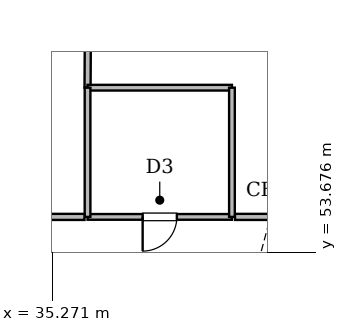
"""IFC4 building model, lengths in metres.
Left out: names, types, materials, properties, quantities, classifications, styles, units other than length and angle.
Written with IfcOpenShell. Run it as: python <this file> out.ifc"""

import sys

from ifc_helpers import new_model, si_unit, direction, frame, frame_2d, origin, place, context, subcontext, project, spatial, rectangle, extrude, element, fill, save


model = new_model("IFC4")
c1 = context("Model", 3, precision=1e-05, world=origin(), true_north=direction((0.0, 1.0)))
c2 = subcontext(c1, "Body", "Model", "MODEL_VIEW")
j1 = project(units=[si_unit("LENGTHUNIT", "METRE"), si_unit("PLANEANGLEUNIT", "RADIAN")], contexts=[c1])
p1 = place(None, origin())
s1 = spatial("IfcSite", under=j1, at=p1, CompositionType="ELEMENT")
p2 = place(p1, origin())
s2 = spatial("IfcBuilding", under=s1, at=p2, CompositionType="ELEMENT")
p3 = place(p2, frame((0.0, 0.0, 24.0)))
s3 = spatial("IfcBuildingStorey", under=s2, at=p3, CompositionType="ELEMENT", Elevation=24.0)
p4 = place(p3, frame((40.0, 54.6, 0.0), z_axis=(0.0, 0.0, 1.0), x_axis=(-1.0, 0.0, 0.0)))
e1 = element("IfcWall", 1, at=p4, inside=s3, PredefinedType="PLUMBINGWALL", context=c2, shape_type="SweptSolid", body=[
    extrude(rectangle(XDim=3.8, YDim=0.15, at=frame_2d((1.9, 0.0))), origin(), (0.0, 0.0, 1.0), 4.263),
])
p5 = place(p4, frame((1.45, 0.0, 0.0)))
e2 = element("IfcOpeningElement", 2, at=p5, cuts=e1, PredefinedType="OPENING", context=c2, shape_type="SweptSolid", body=[
    extrude(rectangle(XDim=0.9, YDim=2.1, at=frame_2d((0.45, 1.05))), frame((0.0, 0.085, 0.0), z_axis=(0.0, -1.0, 0.0), x_axis=(1.0, 0.0, 0.0)), (0.0, 0.0, 1.0), 0.17),
])
p6 = place(p3, frame((36.2, 58.0, 0.0), z_axis=(0.0, 0.0, 1.0), x_axis=(0.005929465439, 0.999982420565, 0.0)))
e3 = element("IfcWall", 3, at=p6, inside=s3, PredefinedType="SOLIDWALL", context=c2, shape_type="SweptSolid", body=[
    extrude(rectangle(XDim=12.805, YDim=0.16, at=frame_2d((6.403, 0.0))), origin(), (0.0, 0.0, 1.0), 2.913),
])
p7 = place(p3, frame((52.47, 54.6, 0.0), z_axis=(0.0, 0.0, 1.0), x_axis=(-1.0, 0.0, 0.0)))
e4 = element("IfcWall", 4, at=p7, inside=s3, PredefinedType="SOLIDWALL", context=c2, shape_type="SweptSolid", body=[
    extrude(rectangle(XDim=12.39, YDim=0.16, at=frame_2d((6.195, 0.0))), origin(), (0.0, 0.0, 1.0), 4.263),
])
p8 = place(p3, frame((40.0, 58.0, 0.0), z_axis=(0.0, 0.0, 1.0), x_axis=(-1.0, 0.0, 0.0)))
e5 = element("IfcWall", 5, at=p8, inside=s3, PredefinedType="PLUMBINGWALL", context=c2, shape_type="SweptSolid", body=[
    extrude(rectangle(XDim=3.8, YDim=0.15, at=frame_2d((1.9, 0.0))), origin(), (0.0, 0.0, 1.0), 4.925),
])
p9 = place(p3, frame((36.2, 58.0, 0.0), z_axis=(0.0, 0.0, 1.0), x_axis=(0.0, -1.0, 0.0)))
e6 = element("IfcWall", 6, at=p9, inside=s3, PredefinedType="PLUMBINGWALL", context=c2, shape_type="SweptSolid", body=[
    extrude(rectangle(XDim=3.4, YDim=0.15, at=frame_2d((1.7, 0.0))), origin(), (0.0, 0.0, 1.0), 4.925),
])
p10 = place(p3, frame((40.0, 54.6, 0.0), z_axis=(0.0, 0.0, 1.0), x_axis=(0.0, 1.0, 0.0)))
e7 = element("IfcWall", 7, at=p10, inside=s3, PredefinedType="PLUMBINGWALL", context=c2, shape_type="SweptSolid", body=[
    extrude(rectangle(XDim=3.4, YDim=0.15, at=frame_2d((1.7, 0.0))), origin(), (0.0, 0.0, 1.0), 4.263),
])
p11 = place(p3, frame((36.12, 54.6, 0.0), z_axis=(0.0, 0.0, 1.0), x_axis=(-1.0, 0.0, 0.0)))
e8 = element("IfcWall", 8, at=p11, inside=s3, PredefinedType="SOLIDWALL", context=c2, shape_type="SweptSolid", body=[
    extrude(rectangle(XDim=2.64, YDim=0.16, at=frame_2d((1.32, 0.0))), origin(), (0.0, 0.0, 1.0), 4.925),
])
p12 = place(p5, origin())
e9 = element("IfcDoor", 9, at=p12, inside=s3, OperationType="SINGLE_SWING_RIGHT", PredefinedType="DOOR", context=c2, shape_type="SweptSolid", body=[
    extrude(rectangle(XDim=0.9, YDim=2.1, at=frame_2d((0.45, 1.05))), frame((0.0, 0.025, 0.0), z_axis=(0.0, -1.0, 0.0), x_axis=(1.0, 0.0, 0.0)), (0.0, 0.0, 1.0), 0.05),
])
fill(e2, e9)
save(model, sys.argv[1])
